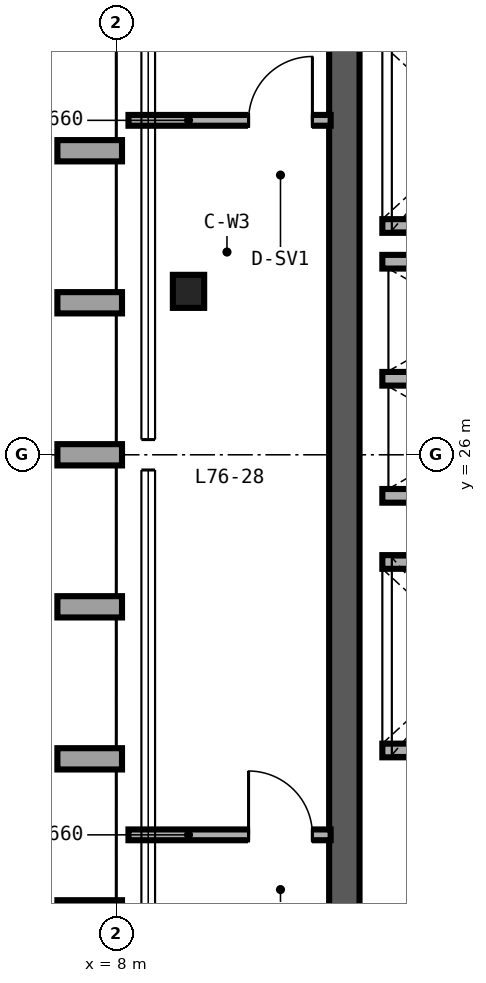
"""IFC4 building model, lengths in metres.
Left out: names, types, materials, properties, quantities, classifications, styles, units other than length and angle.
Written with IfcOpenShell. Run it as: python <this file> out.ifc"""

import sys

from ifc_helpers import new_model, si_unit, direction, frame, frame_2d, origin, origin_2d, place, context, subcontext, project, spatial, rectangle, i_section, extrude, source, transform, mapped, element, fill, save


model = new_model("IFC4")
c1 = context("Model", 3, precision=1e-05, world=origin(), true_north=direction((0.0, 1.0)))
c2 = subcontext(c1, "Body", "Model", "MODEL_VIEW")
j1 = project(units=[si_unit("LENGTHUNIT", "METRE"), si_unit("PLANEANGLEUNIT", "RADIAN")], contexts=[c1])
p1 = place(None, origin())
s1 = spatial("IfcSite", under=j1, at=p1, CompositionType="ELEMENT")
p2 = place(p1, origin())
s2 = spatial("IfcBuilding", under=s1, at=p2, CompositionType="ELEMENT")
p3 = place(p2, frame((0.0, 0.0, 297.6)))
s3 = spatial("IfcBuildingStorey", under=s2, at=p3, CompositionType="ELEMENT", Elevation=297.6)
p4 = place(p3, frame((11.0, 15.2, 0.0), z_axis=(0.0, 0.0, 1.0), x_axis=(0.0, 1.0, 0.0)))
e1 = element("IfcWall", 1, at=p4, inside=s3, PredefinedType="SHEAR", context=c2, shape_type="SweptSolid", body=[
    extrude(rectangle(XDim=21.6, YDim=0.4, at=frame_2d((10.8, 0.0))), origin(), (0.0, 0.0, 1.0), 3.32),
])
m1 = source(origin(), c2, "Body", "SweptSolid", [
    extrude(i_section(OverallWidth=0.412, OverallDepth=0.435, WebThickness=0.036, FlangeThickness=0.057, FilletRadius=0.025, at=origin_2d()), origin(), (0.0, 0.0, 1.0), 3.32),
])
p5 = place(p3, frame((8.95, 28.15, 0.0), z_axis=(0.0, 0.0, 1.0), x_axis=(1.0, 0.0, 0.0)))
e2 = element("IfcColumn", 2, at=p5, inside=s3, PredefinedType="COLUMN", context=c2, shape_type="MappedRepresentation", body=[
    mapped(m1, transform((0.0, 0.0, 0.0), scale=1.0)),
])
for number, where, z_axis, x_axis in (
    (3, (11.5, 22.11, 0.0), (0.0, 0.0, 1.0), (1.0, 0.0, 0.0)),
    (4, (11.5, 24.59, 0.0), (0.0, 0.0, 1.0), (1.0, 0.0, 0.0)),
    (5, (11.5, 29.01, 0.0), (0.0, 0.0, 1.0), (1.0, 0.0, 0.0)),
):
    element("IfcWall", number, at=place(p3, frame(where, z_axis=z_axis, x_axis=x_axis)), inside=s3, PredefinedType="SOLIDWALL", context=c2, shape_type="SweptSolid", body=[
        extrude(rectangle(XDim=2.5, YDim=0.18, at=frame_2d((1.25, 0.0))), origin(), (0.0, 0.0, 1.0), 3.32),
    ])
for number, where, z_axis, x_axis in (
    (6, (11.5, 25.46, 0.0), (0.0, 0.0, 1.0), (1.0, 0.0, 0.0)),
    (7, (11.5, 27.0, 0.0), (0.0, 0.0, 1.0), (1.0, 0.0, 0.0)),
    (8, (11.5, 28.54, 0.0), (0.0, 0.0, 1.0), (1.0, 0.0, 0.0)),
):
    element("IfcWall", number, at=place(p3, frame(where, z_axis=z_axis, x_axis=x_axis)), inside=s3, PredefinedType="SOLIDWALL", context=c2, shape_type="SweptSolid", body=[
        extrude(rectangle(XDim=2.51, YDim=0.18, at=frame_2d((1.255, 0.0))), origin(), (0.0, 0.0, 1.0), 3.32),
    ])
p6 = place(p3, frame((8.16, 21.0, 0.0), z_axis=(0.0, 0.0, 1.0), x_axis=(1.0, 0.0, 0.0)))
e9 = element("IfcWall", 9, at=p6, inside=s3, PredefinedType="PARTITIONING", context=c2, shape_type="SweptSolid", body=[
    extrude(rectangle(XDim=2.66, YDim=0.142, at=frame_2d((1.33, 0.0))), origin(), (0.0, 0.0, 1.0), 2.42),
])
p7 = place(p6, frame((1.58, 0.0, 0.0)))
e10 = element("IfcOpeningElement", 10, at=p7, cuts=e9, PredefinedType="OPENING", context=c2, shape_type="SweptSolid", body=[
    extrude(rectangle(XDim=0.84, YDim=2.1, at=frame_2d((0.42, 1.05))), frame((0.0, 0.081, 0.0), z_axis=(0.0, -1.0, 0.0), x_axis=(1.0, 0.0, 0.0)), (0.0, 0.0, 1.0), 0.162),
])
p8 = place(p3, frame((8.16, 30.4, 0.0), z_axis=(0.0, 0.0, 1.0), x_axis=(1.0, 0.0, 0.0)))
e11 = element("IfcWall", 11, at=p8, inside=s3, PredefinedType="PARTITIONING", context=c2, shape_type="SweptSolid", body=[
    extrude(rectangle(XDim=2.66, YDim=0.142, at=frame_2d((1.33, 0.0))), origin(), (0.0, 0.0, 1.0), 2.703),
])
p9 = place(p8, frame((1.58, 0.0, 0.0)))
e12 = element("IfcOpeningElement", 12, at=p9, cuts=e11, PredefinedType="OPENING", context=c2, shape_type="SweptSolid", body=[
    extrude(rectangle(XDim=0.84, YDim=2.1, at=frame_2d((0.42, 1.05))), frame((0.0, 0.081, 0.0), z_axis=(0.0, -1.0, 0.0), x_axis=(1.0, 0.0, 0.0)), (0.0, 0.0, 1.0), 0.162),
])
m2 = source(origin(), c2, "Body", "SweptSolid", [
    extrude(rectangle(XDim=0.84, YDim=2.1, at=frame_2d((0.42, 1.05))), frame((0.0, 0.025, 0.0), z_axis=(0.0, -1.0, 0.0), x_axis=(1.0, 0.0, 0.0)), (0.0, 0.0, 1.0), 0.05),
])
p10 = place(p7, origin())
e13 = element("IfcDoor", 13, at=p10, inside=s3, OperationType="SINGLE_SWING_LEFT", PredefinedType="DOOR", context=c2, shape_type="MappedRepresentation", body=[
    mapped(m2, transform((0.0, 0.0, 0.0), scale=1.0)),
])
fill(e10, e13)
p11 = place(p9, origin())
e14 = element("IfcDoor", 14, at=p11, inside=s3, OperationType="SINGLE_SWING_RIGHT", PredefinedType="DOOR", context=c2, shape_type="MappedRepresentation", body=[
    mapped(m2, transform((0.0, 0.0, 0.0), scale=1.0)),
])
fill(e12, e14)
save(model, sys.argv[1])
